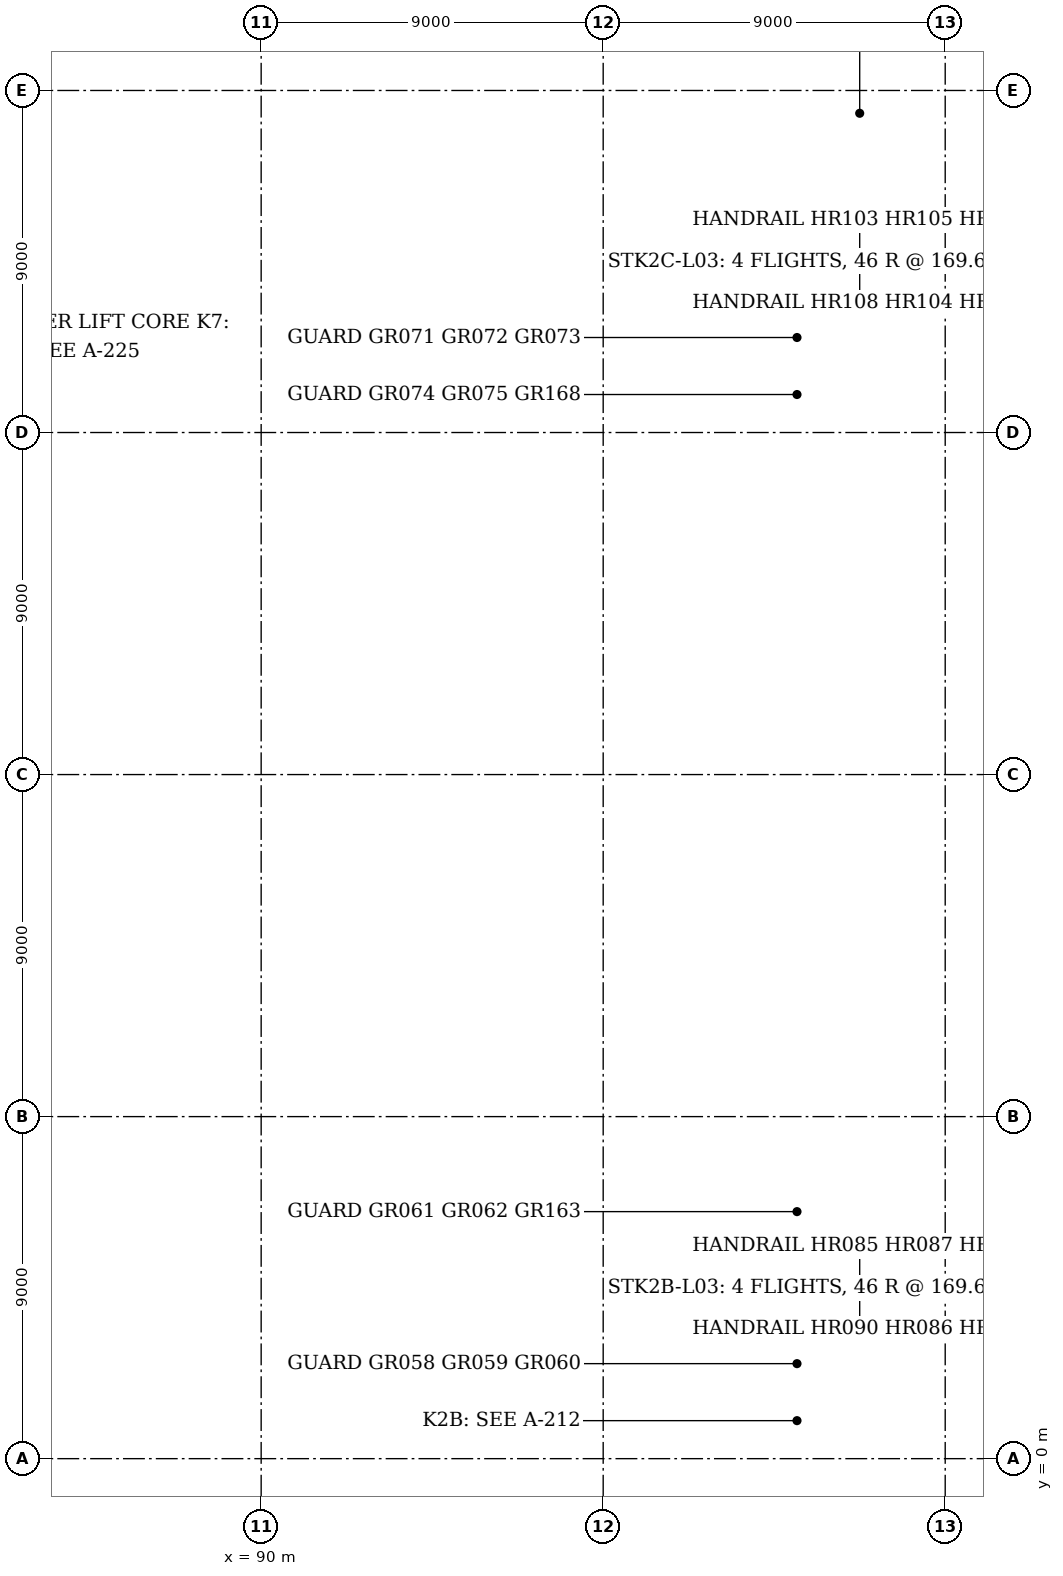
"""IFC4 building model, lengths in metres.
Left out: names, types, materials, properties, quantities, classifications, styles, units other than length and angle.
Written with IfcOpenShell. Run it as: python <this file> out.ifc"""

import sys

from ifc_helpers import new_model, si_unit, direction, frame, frame_2d, origin, origin_2d, place, context, subcontext, project, spatial, rectangle, hollow_rectangle, hollow_circle, extrude, element, fill, save


model = new_model("IFC4")
c1 = context("Model", 3, precision=1e-05, world=origin(), true_north=direction((0.0, 1.0)))
c2 = subcontext(c1, "Body", "Model", "MODEL_VIEW")
j1 = project(units=[si_unit("LENGTHUNIT", "METRE"), si_unit("PLANEANGLEUNIT", "RADIAN")], contexts=[c1])
p1 = place(None, origin())
s1 = spatial("IfcSite", under=j1, at=p1, CompositionType="ELEMENT")
p2 = place(p1, origin())
s2 = spatial("IfcBuilding", under=s1, at=p2, CompositionType="ELEMENT")
p3 = place(p2, frame((0.0, 0.0, 13.4)))
s3 = spatial("IfcBuildingStorey", under=s2, at=p3, CompositionType="ELEMENT", Elevation=13.4)
p4 = place(p3, frame((90.0, 0.0, 0.0), z_axis=(0.0, 0.0, 1.0), x_axis=(1.0, 0.0, 0.0)))
e1 = element("IfcColumn", 1, at=p4, inside=s3, PredefinedType="COLUMN", context=c2, shape_type="SweptSolid", body=[
    extrude(hollow_rectangle(XDim=0.3, YDim=0.3, WallThickness=0.01, InnerFilletRadius=0.015, OuterFilletRadius=0.025, at=origin_2d()), origin(), (0.0, 0.0, 1.0), 7.8),
])
p5 = place(p3, frame((99.0, 0.0, 0.0), z_axis=(0.0, 0.0, 1.0), x_axis=(1.0, 0.0, 0.0)))
e2 = element("IfcColumn", 2, at=p5, inside=s3, PredefinedType="COLUMN", context=c2, shape_type="SweptSolid", body=[
    extrude(hollow_rectangle(XDim=0.3, YDim=0.3, WallThickness=0.016, InnerFilletRadius=0.024, OuterFilletRadius=0.04, at=origin_2d()), origin(), (0.0, 0.0, 1.0), 7.8),
])
p6 = place(p3, frame((90.0, 9.0, 0.0), z_axis=(0.0, 0.0, 1.0), x_axis=(1.0, 0.0, 0.0)))
e3 = element("IfcColumn", 3, at=p6, inside=s3, PredefinedType="COLUMN", context=c2, shape_type="SweptSolid", body=[
    extrude(hollow_circle(Radius=0.178, WallThickness=0.013, at=origin_2d()), origin(), (0.0, 0.0, 1.0), 7.8),
])
p7 = place(p3, frame((99.0, 9.0, 0.0), z_axis=(0.0, 0.0, 1.0), x_axis=(1.0, 0.0, 0.0)))
e4 = element("IfcColumn", 4, at=p7, inside=s3, PredefinedType="COLUMN", context=c2, shape_type="SweptSolid", body=[
    extrude(hollow_circle(Radius=0.203, WallThickness=0.013, at=origin_2d()), origin(), (0.0, 0.0, 1.0), 7.8),
])
p8 = place(p3, frame((99.0, 18.0, 0.0), z_axis=(0.0, 0.0, 1.0), x_axis=(1.0, 0.0, 0.0)))
e5 = element("IfcColumn", 5, at=p8, inside=s3, PredefinedType="COLUMN", context=c2, shape_type="SweptSolid", body=[
    extrude(hollow_circle(Radius=0.178, WallThickness=0.013, at=origin_2d()), origin(), (0.0, 0.0, 1.0), 7.8),
])
p9 = place(p3, frame((108.0, 18.0, 0.0), z_axis=(0.0, 0.0, 1.0), x_axis=(1.0, 0.0, 0.0)))
e6 = element("IfcColumn", 6, at=p9, inside=s3, PredefinedType="COLUMN", context=c2, shape_type="SweptSolid", body=[
    extrude(hollow_rectangle(XDim=0.3, YDim=0.3, WallThickness=0.016, InnerFilletRadius=0.024, OuterFilletRadius=0.04, at=origin_2d()), origin(), (0.0, 0.0, 1.0), 7.8),
])
p10 = place(p3, frame((90.0, 27.0, 0.0), z_axis=(0.0, 0.0, 1.0), x_axis=(1.0, 0.0, 0.0)))
e7 = element("IfcColumn", 7, at=p10, inside=s3, PredefinedType="COLUMN", context=c2, shape_type="SweptSolid", body=[
    extrude(hollow_circle(Radius=0.178, WallThickness=0.013, at=origin_2d()), origin(), (0.0, 0.0, 1.0), 7.8),
])
p11 = place(p3, frame((99.0, 27.0, 0.0), z_axis=(0.0, 0.0, 1.0), x_axis=(1.0, 0.0, 0.0)))
e8 = element("IfcColumn", 8, at=p11, inside=s3, PredefinedType="COLUMN", context=c2, shape_type="SweptSolid", body=[
    extrude(hollow_circle(Radius=0.203, WallThickness=0.013, at=origin_2d()), origin(), (0.0, 0.0, 1.0), 7.8),
])
p12 = place(p3, frame((90.0, 36.0, 0.0), z_axis=(0.0, 0.0, 1.0), x_axis=(1.0, 0.0, 0.0)))
e9 = element("IfcColumn", 9, at=p12, inside=s3, PredefinedType="COLUMN", context=c2, shape_type="SweptSolid", body=[
    extrude(hollow_rectangle(XDim=0.3, YDim=0.3, WallThickness=0.01, InnerFilletRadius=0.015, OuterFilletRadius=0.025, at=origin_2d()), origin(), (0.0, 0.0, 1.0), 7.8),
])
p13 = place(p3, frame((99.0, 36.0, 0.0), z_axis=(0.0, 0.0, 1.0), x_axis=(1.0, 0.0, 0.0)))
e10 = element("IfcColumn", 10, at=p13, inside=s3, PredefinedType="COLUMN", context=c2, shape_type="SweptSolid", body=[
    extrude(hollow_rectangle(XDim=0.3, YDim=0.3, WallThickness=0.016, InnerFilletRadius=0.024, OuterFilletRadius=0.04, at=origin_2d()), origin(), (0.0, 0.0, 1.0), 7.8),
])
p14 = place(p3, frame((99.15, 35.91, 0.0), z_axis=(0.0, 0.0, 1.0), x_axis=(1.0, 0.0, 0.0)))
e11 = element("IfcWall", 11, at=p14, inside=s3, PredefinedType="SOLIDWALL", context=c2, shape_type="SweptSolid", body=[
    extrude(rectangle(XDim=4.35, YDim=0.3, at=frame_2d((2.175, 0.0))), origin(), (0.0, 0.0, 1.0), 6.935),
])
p15 = place(p3, frame((81.15, 35.91, 0.0), z_axis=(0.0, 0.0, 1.0), x_axis=(1.0, 0.0, 0.0)))
e12 = element("IfcWall", 12, at=p15, inside=s3, PredefinedType="SOLIDWALL", context=c2, shape_type="SweptSolid", body=[
    extrude(rectangle(XDim=8.7, YDim=0.3, at=frame_2d((4.35, 0.0))), origin(), (0.0, 0.0, 1.0), 6.935),
])
p16 = place(p3, frame((92.25, 35.85, 0.0), z_axis=(0.0, 0.0, 1.0), x_axis=(1.0, 0.0, 0.0)))
e13 = element("IfcWall", 13, at=p16, inside=s3, PredefinedType="SOLIDWALL", context=c2, shape_type="SweptSolid", body=[
    extrude(rectangle(XDim=4.5, YDim=0.2, at=frame_2d((2.25, 0.0))), origin(), (0.0, 0.0, 1.0), 7.635),
])
p17 = place(p16, frame((2.4, 0.0, 0.0)))
e14 = element("IfcOpeningElement", 14, at=p17, cuts=e13, PredefinedType="OPENING", context=c2, shape_type="SweptSolid", body=[
    extrude(rectangle(XDim=1.8, YDim=2.4, at=frame_2d((0.9, 1.2))), frame((0.0, 0.11, 0.0), z_axis=(0.0, -1.0, 0.0), x_axis=(1.0, 0.0, 0.0)), (0.0, 0.0, 1.0), 0.22),
])
p18 = place(p16, frame((0.3, 0.0, 0.0)))
e15 = element("IfcOpeningElement", 15, at=p18, cuts=e13, PredefinedType="OPENING", context=c2, shape_type="SweptSolid", body=[
    extrude(rectangle(XDim=1.8, YDim=2.4, at=frame_2d((0.9, 1.2))), frame((0.0, 0.11, 0.0), z_axis=(0.0, -1.0, 0.0), x_axis=(1.0, 0.0, 0.0)), (0.0, 0.0, 1.0), 0.22),
])
p19 = place(p3, frame((103.5, 0.15, 0.0), z_axis=(0.0, 0.0, 1.0), x_axis=(1.0, 0.0, 0.0)))
e16 = element("IfcWall", 16, at=p19, inside=s3, PredefinedType="SOLIDWALL", context=c2, shape_type="SweptSolid", body=[
    extrude(rectangle(XDim=4.5, YDim=0.3, at=frame_2d((2.25, 0.0))), origin(), (0.0, 0.0, 1.0), 7.8),
])
p20 = place(p3, frame((107.85, 0.3, 0.0), z_axis=(0.0, 0.0, 1.0), x_axis=(0.0, 1.0, 0.0)))
e17 = element("IfcWall", 17, at=p20, inside=s3, PredefinedType="SOLIDWALL", context=c2, shape_type="SweptSolid", body=[
    extrude(rectangle(XDim=8.4, YDim=0.3, at=frame_2d((4.2, 0.0))), origin(), (0.0, 0.0, 1.0), 7.8),
])
p21 = place(p3, frame((103.5, 8.85, 0.0), z_axis=(0.0, 0.0, 1.0), x_axis=(1.0, 0.0, 0.0)))
e18 = element("IfcWall", 18, at=p21, inside=s3, PredefinedType="SOLIDWALL", context=c2, shape_type="SweptSolid", body=[
    extrude(rectangle(XDim=4.5, YDim=0.3, at=frame_2d((2.25, 0.0))), origin(), (0.0, 0.0, 1.0), 7.8),
])
p22 = place(p21, frame((2.95, 0.0, 0.0)))
e19 = element("IfcOpeningElement", 19, at=p22, cuts=e18, PredefinedType="OPENING", context=c2, shape_type="SweptSolid", body=[
    extrude(rectangle(XDim=1.2, YDim=2.1, at=frame_2d((0.6, 1.05))), frame((0.0, 0.16, 0.0), z_axis=(0.0, -1.0, 0.0), x_axis=(1.0, 0.0, 0.0)), (0.0, 0.0, 1.0), 0.32),
])
p23 = place(p3, frame((103.65, 0.3, 0.0), z_axis=(0.0, 0.0, 1.0), x_axis=(0.0, 1.0, 0.0)))
e20 = element("IfcWall", 20, at=p23, inside=s3, PredefinedType="SOLIDWALL", context=c2, shape_type="SweptSolid", body=[
    extrude(rectangle(XDim=8.4, YDim=0.3, at=frame_2d((4.2, 0.0))), origin(), (0.0, 0.0, 1.0), 7.8),
])
p24 = place(p3, frame((103.5, 27.15, 0.0), z_axis=(0.0, 0.0, 1.0), x_axis=(1.0, 0.0, 0.0)))
e21 = element("IfcWall", 21, at=p24, inside=s3, PredefinedType="SOLIDWALL", context=c2, shape_type="SweptSolid", body=[
    extrude(rectangle(XDim=4.5, YDim=0.3, at=frame_2d((2.25, 0.0))), origin(), (0.0, 0.0, 1.0), 7.8),
])
p25 = place(p24, frame((2.95, 0.0, 0.0)))
e22 = element("IfcOpeningElement", 22, at=p25, cuts=e21, PredefinedType="OPENING", context=c2, shape_type="SweptSolid", body=[
    extrude(rectangle(XDim=1.2, YDim=2.1, at=frame_2d((0.6, 1.05))), frame((0.0, 0.16, 0.0), z_axis=(0.0, -1.0, 0.0), x_axis=(1.0, 0.0, 0.0)), (0.0, 0.0, 1.0), 0.32),
])
p26 = place(p3, frame((107.85, 27.3, 0.0), z_axis=(0.0, 0.0, 1.0), x_axis=(0.0, 1.0, 0.0)))
e23 = element("IfcWall", 23, at=p26, inside=s3, PredefinedType="SOLIDWALL", context=c2, shape_type="SweptSolid", body=[
    extrude(rectangle(XDim=8.4, YDim=0.3, at=frame_2d((4.2, 0.0))), origin(), (0.0, 0.0, 1.0), 7.8),
])
p27 = place(p3, frame((103.5, 35.85, 0.0), z_axis=(0.0, 0.0, 1.0), x_axis=(1.0, 0.0, 0.0)))
e24 = element("IfcWall", 24, at=p27, inside=s3, PredefinedType="SOLIDWALL", context=c2, shape_type="SweptSolid", body=[
    extrude(rectangle(XDim=4.5, YDim=0.3, at=frame_2d((2.25, 0.0))), origin(), (0.0, 0.0, 1.0), 7.8),
])
p28 = place(p3, frame((103.65, 27.3, 0.0), z_axis=(0.0, 0.0, 1.0), x_axis=(0.0, 1.0, 0.0)))
e25 = element("IfcWall", 25, at=p28, inside=s3, PredefinedType="SOLIDWALL", context=c2, shape_type="SweptSolid", body=[
    extrude(rectangle(XDim=8.4, YDim=0.3, at=frame_2d((4.2, 0.0))), origin(), (0.0, 0.0, 1.0), 7.8),
])
p29 = place(p3, frame((99.203, 9.0, 0.0), z_axis=(0.0, 0.0, 1.0), x_axis=(1.0, 0.0, 0.0)))
e26 = element("IfcWall", 26, at=p29, inside=s3, PredefinedType="PARTITIONING", context=c2, shape_type="SweptSolid", body=[
    extrude(rectangle(XDim=4.297, YDim=0.15, at=frame_2d((2.148, 0.0))), origin(), (0.0, 0.0, 1.0), 7.175),
])
p30 = place(p29, frame((0.95, 0.0, 0.0)))
e27 = element("IfcOpeningElement", 27, at=p30, cuts=e26, PredefinedType="OPENING", context=c2, shape_type="SweptSolid", body=[
    extrude(rectangle(XDim=2.4, YDim=2.4, at=frame_2d((1.2, 1.2))), frame((0.0, 0.085, 0.0), z_axis=(0.0, -1.0, 0.0), x_axis=(1.0, 0.0, 0.0)), (0.0, 0.0, 1.0), 0.17),
])
p31 = place(p3, frame((85.5, 0.0, 0.0), z_axis=(0.0, 0.0, 1.0), x_axis=(0.0, 1.0, 0.0)))
e28 = element("IfcWall", 28, at=p31, inside=s3, PredefinedType="PARTITIONING", context=c2, shape_type="SweptSolid", body=[
    extrude(rectangle(XDim=9.0, YDim=0.125, at=frame_2d((4.5, 0.0))), origin(), (0.0, 0.0, 1.0), 7.635),
])
p32 = place(p31, frame((3.95, 0.0, 0.0)))
e29 = element("IfcOpeningElement", 29, at=p32, cuts=e28, PredefinedType="OPENING", context=c2, shape_type="SweptSolid", body=[
    extrude(rectangle(XDim=1.0, YDim=2.1, at=frame_2d((0.5, 1.05))), frame((0.0, 0.073, 0.0), z_axis=(0.0, -1.0, 0.0), x_axis=(1.0, 0.0, 0.0)), (0.0, 0.0, 1.0), 0.145),
])
p33 = place(p3, frame((99.203, 27.0, 0.0), z_axis=(0.0, 0.0, 1.0), x_axis=(1.0, 0.0, 0.0)))
e30 = element("IfcWall", 30, at=p33, inside=s3, PredefinedType="PARTITIONING", context=c2, shape_type="SweptSolid", body=[
    extrude(rectangle(XDim=4.297, YDim=0.2, at=frame_2d((2.148, 0.0))), origin(), (0.0, 0.0, 1.0), 7.175),
])
p34 = place(p33, frame((0.95, 0.0, 0.0)))
e31 = element("IfcOpeningElement", 31, at=p34, cuts=e30, PredefinedType="OPENING", context=c2, shape_type="SweptSolid", body=[
    extrude(rectangle(XDim=2.4, YDim=2.4, at=frame_2d((1.2, 1.2))), frame((0.0, 0.11, 0.0), z_axis=(0.0, -1.0, 0.0), x_axis=(1.0, 0.0, 0.0)), (0.0, 0.0, 1.0), 0.22),
])
p35 = place(p17, origin())
e32 = element("IfcDoor", 32, at=p35, inside=s3, OperationType="DOUBLE_DOOR_SINGLE_SWING", PredefinedType="DOOR", context=c2, shape_type="SweptSolid", body=[
    extrude(rectangle(XDim=1.8, YDim=2.4, at=frame_2d((0.9, 1.2))), frame((0.0, 0.025, 0.0), z_axis=(0.0, -1.0, 0.0), x_axis=(1.0, 0.0, 0.0)), (0.0, 0.0, 1.0), 0.05),
])
fill(e14, e32)
p36 = place(p18, origin())
e33 = element("IfcDoor", 33, at=p36, inside=s3, OperationType="DOUBLE_DOOR_SINGLE_SWING", PredefinedType="DOOR", context=c2, shape_type="SweptSolid", body=[
    extrude(rectangle(XDim=1.8, YDim=2.4, at=frame_2d((0.9, 1.2))), frame((0.0, 0.025, 0.0), z_axis=(0.0, -1.0, 0.0), x_axis=(1.0, 0.0, 0.0)), (0.0, 0.0, 1.0), 0.05),
])
fill(e15, e33)
p37 = place(p22, frame((1.2, 0.0, 0.0), z_axis=(0.0, 0.0, 1.0), x_axis=(-1.0, 0.0, 0.0)))
e34 = element("IfcDoor", 34, at=p37, inside=s3, OperationType="SINGLE_SWING_RIGHT", PredefinedType="DOOR", context=c2, shape_type="SweptSolid", body=[
    extrude(rectangle(XDim=1.2, YDim=2.1, at=frame_2d((0.6, 1.05))), frame((0.0, 0.025, 0.0), z_axis=(0.0, -1.0, 0.0), x_axis=(1.0, 0.0, 0.0)), (0.0, 0.0, 1.0), 0.05),
])
fill(e19, e34)
p38 = place(p25, origin())
e35 = element("IfcDoor", 35, at=p38, inside=s3, OperationType="SINGLE_SWING_LEFT", PredefinedType="DOOR", context=c2, shape_type="SweptSolid", body=[
    extrude(rectangle(XDim=1.2, YDim=2.1, at=frame_2d((0.6, 1.05))), frame((0.0, 0.025, 0.0), z_axis=(0.0, -1.0, 0.0), x_axis=(1.0, 0.0, 0.0)), (0.0, 0.0, 1.0), 0.05),
])
fill(e22, e35)
p39 = place(p30, frame((2.4, 0.0, 0.0), z_axis=(0.0, 0.0, 1.0), x_axis=(-1.0, 0.0, 0.0)))
e36 = element("IfcDoor", 36, at=p39, inside=s3, OperationType="DOUBLE_DOOR_SINGLE_SWING", PredefinedType="DOOR", context=c2, shape_type="SweptSolid", body=[
    extrude(rectangle(XDim=2.4, YDim=2.4, at=frame_2d((1.2, 1.2))), frame((0.0, 0.025, 0.0), z_axis=(0.0, -1.0, 0.0), x_axis=(1.0, 0.0, 0.0)), (0.0, 0.0, 1.0), 0.05),
])
fill(e27, e36)
p40 = place(p34, frame((2.4, 0.0, 0.0), z_axis=(0.0, 0.0, 1.0), x_axis=(-1.0, 0.0, 0.0)))
e37 = element("IfcDoor", 37, at=p40, inside=s3, OperationType="DOUBLE_DOOR_SINGLE_SWING", PredefinedType="DOOR", context=c2, shape_type="SweptSolid", body=[
    extrude(rectangle(XDim=2.4, YDim=2.4, at=frame_2d((1.2, 1.2))), frame((0.0, 0.025, 0.0), z_axis=(0.0, -1.0, 0.0), x_axis=(1.0, 0.0, 0.0)), (0.0, 0.0, 1.0), 0.05),
])
fill(e31, e37)
p41 = place(p32, origin())
e38 = element("IfcDoor", 38, at=p41, inside=s3, OperationType="SINGLE_SWING_RIGHT", PredefinedType="DOOR", context=c2, shape_type="SweptSolid", body=[
    extrude(rectangle(XDim=1.0, YDim=2.1, at=frame_2d((0.5, 1.05))), frame((0.0, 0.025, 0.0), z_axis=(0.0, -1.0, 0.0), x_axis=(1.0, 0.0, 0.0)), (0.0, 0.0, 1.0), 0.05),
])
fill(e29, e38)
save(model, sys.argv[1])
